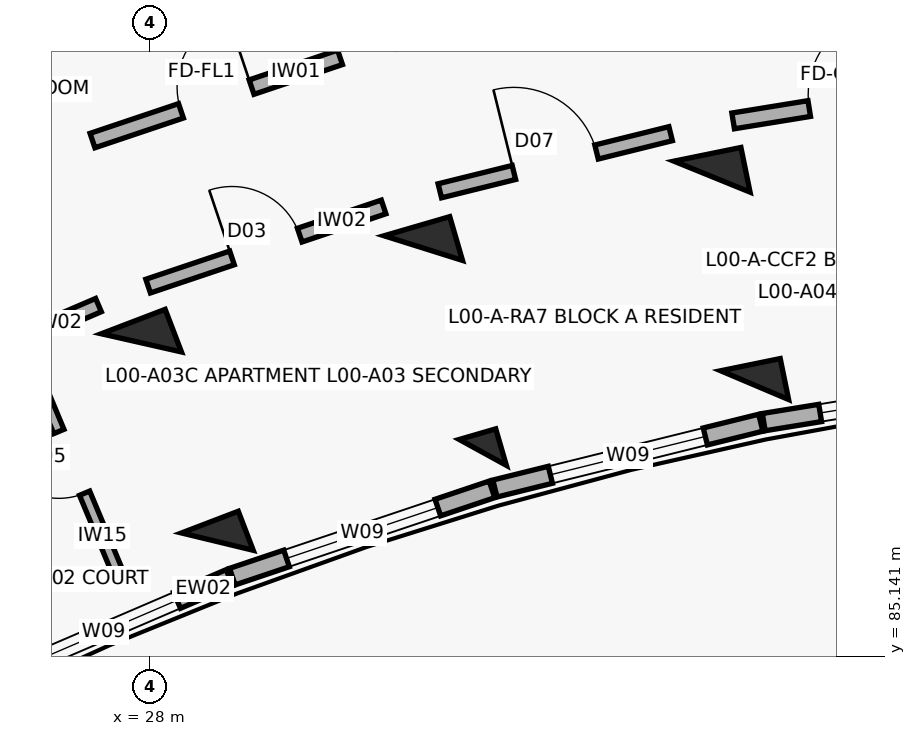
"""IFC4 building model, lengths in metres.
Left out: names, types, materials, properties, quantities, classifications, styles, units other than length and angle.
Written with IfcOpenShell. Run it as: python <this file> out.ifc"""

import sys

from ifc_helpers import new_model, si_unit, direction, frame, frame_2d, origin, origin_2d, place, context, subcontext, project, spatial, rectangle, extrude, element, fill, save


model = new_model("IFC4")
c1 = context("Model", 3, precision=1e-05, world=origin(), true_north=direction((0.0, 1.0)))
c2 = subcontext(c1, "Body", "Model", "MODEL_VIEW")
j1 = project(units=[si_unit("LENGTHUNIT", "METRE"), si_unit("PLANEANGLEUNIT", "RADIAN")], contexts=[c1])
p1 = place(None, origin())
s1 = spatial("IfcSite", under=j1, at=p1, CompositionType="ELEMENT")
p2 = place(p1, origin())
s2 = spatial("IfcBuilding", under=s1, at=p2, CompositionType="ELEMENT")
p3 = place(p2, origin())
s3 = spatial("IfcBuildingStorey", under=s2, at=p3, CompositionType="ELEMENT", Elevation=0.0)
p4 = place(p3, frame((28.889, 86.646, 0.0), z_axis=(0.0, 0.0, 1.0), x_axis=(-0.357064076459, 0.934079892355, 0.0)))
e1 = element("IfcColumn", 1, at=p4, inside=s3, PredefinedType="COLUMN", context=c2, shape_type="SweptSolid", body=[
    extrude(rectangle(XDim=0.55, YDim=0.8, at=origin_2d()), origin(), (0.0, 0.0, 1.0), 4.5),
])
p5 = place(p3, frame((27.889, 89.261, 0.0), z_axis=(0.0, 0.0, 1.0), x_axis=(-0.357064076459, 0.934079892355, 0.0)))
e2 = element("IfcColumn", 2, at=p5, inside=s3, PredefinedType="COLUMN", context=c2, shape_type="SweptSolid", body=[
    extrude(rectangle(XDim=0.6, YDim=0.9, at=origin_2d()), origin(), (0.0, 0.0, 1.0), 4.5),
])
p6 = place(p3, frame((32.382, 87.82, 0.0), z_axis=(0.0, 0.0, 1.0), x_axis=(-0.27966144946, 0.96009867914, 0.0)))
e3 = element("IfcColumn", 3, at=p6, inside=s3, PredefinedType="COLUMN", context=c2, shape_type="SweptSolid", body=[
    extrude(rectangle(XDim=0.5, YDim=0.5, at=origin_2d()), origin(), (0.0, 0.0, 1.0), 4.5),
])
p7 = place(p3, frame((31.599, 90.508, 0.0), z_axis=(0.0, 0.0, 1.0), x_axis=(-0.27966144946, 0.96009867914, 0.0)))
e4 = element("IfcColumn", 4, at=p7, inside=s3, PredefinedType="COLUMN", context=c2, shape_type="SweptSolid", body=[
    extrude(rectangle(XDim=0.6, YDim=0.9, at=origin_2d()), origin(), (0.0, 0.0, 1.0), 4.5),
])
p8 = place(p3, frame((35.958, 88.705, 0.0), z_axis=(0.0, 0.0, 1.0), x_axis=(-0.200393999665, 0.979715389742, 0.0)))
e5 = element("IfcColumn", 5, at=p8, inside=s3, PredefinedType="COLUMN", context=c2, shape_type="SweptSolid", body=[
    extrude(rectangle(XDim=0.55, YDim=0.8, at=origin_2d()), origin(), (0.0, 0.0, 1.0), 4.5),
])
p9 = place(p3, frame((35.397, 91.448, 0.0), z_axis=(0.0, 0.0, 1.0), x_axis=(-0.200393999665, 0.979715389742, 0.0)))
e6 = element("IfcColumn", 6, at=p9, inside=s3, PredefinedType="COLUMN", context=c2, shape_type="SweptSolid", body=[
    extrude(rectangle(XDim=0.6, YDim=0.9, at=origin_2d()), origin(), (0.0, 0.0, 1.0), 4.5),
])
p10 = place(p3, frame((25.739, 84.748, 0.0), z_axis=(0.0, 0.0, 1.0), x_axis=(0.918713438577, 0.394924825477, 0.0)))
e7 = element("IfcWall", 7, at=p10, inside=s3, PredefinedType="SOLIDWALL", context=c2, shape_type="SweptSolid", body=[
    extrude(rectangle(XDim=3.604, YDim=0.23, at=frame_2d((1.802, 0.0))), origin(), (0.0, 0.0, 1.0), 3.45),
])
p11 = place(p10, frame((0.752, 0.0, 0.32)))
e8 = element("IfcOpeningElement", 8, at=p11, cuts=e7, PredefinedType="OPENING", context=c2, shape_type="SweptSolid", body=[
    extrude(rectangle(XDim=2.1, YDim=1.65, at=frame_2d((1.05, 0.825))), frame((0.0, 0.125, 0.0), z_axis=(0.0, -1.0, 0.0), x_axis=(1.0, 0.0, 0.0)), (0.0, 0.0, 1.0), 0.25),
])
p12 = place(p3, frame((29.087, 86.185, 0.0), z_axis=(0.0, 0.0, 1.0), x_axis=(0.947880824442, 0.318625081649, 0.0)))
e9 = element("IfcWall", 9, at=p12, inside=s3, PredefinedType="SOLIDWALL", context=c2, shape_type="SweptSolid", body=[
    extrude(rectangle(XDim=3.604, YDim=0.23, at=frame_2d((1.802, 0.0))), origin(), (0.0, 0.0, 1.0), 3.45),
])
p13 = place(p12, frame((0.752, 0.0, 0.32)))
e10 = element("IfcOpeningElement", 10, at=p13, cuts=e9, PredefinedType="OPENING", context=c2, shape_type="SweptSolid", body=[
    extrude(rectangle(XDim=2.1, YDim=1.65, at=frame_2d((1.05, 0.825))), frame((0.0, 0.125, 0.0), z_axis=(0.0, -1.0, 0.0), x_axis=(1.0, 0.0, 0.0)), (0.0, 0.0, 1.0), 0.25),
])
p14 = place(p3, frame((32.541, 87.344, 0.0), z_axis=(0.0, 0.0, 1.0), x_axis=(0.970713661797, 0.240239436399, 0.0)))
e11 = element("IfcWall", 11, at=p14, inside=s3, PredefinedType="SOLIDWALL", context=c2, shape_type="SweptSolid", body=[
    extrude(rectangle(XDim=3.604, YDim=0.23, at=frame_2d((1.802, 0.0))), origin(), (0.0, 0.0, 1.0), 3.45),
])
p15 = place(p14, frame((0.752, 0.0, 0.32)))
e12 = element("IfcOpeningElement", 12, at=p15, cuts=e11, PredefinedType="OPENING", context=c2, shape_type="SweptSolid", body=[
    extrude(rectangle(XDim=2.1, YDim=1.65, at=frame_2d((1.05, 0.825))), frame((0.0, 0.125, 0.0), z_axis=(0.0, -1.0, 0.0), x_axis=(1.0, 0.0, 0.0)), (0.0, 0.0, 1.0), 0.25),
])
p16 = place(p3, frame((36.078, 88.218, 0.0), z_axis=(0.0, 0.0, 1.0), x_axis=(0.987080874485, 0.160222804952, 0.0)))
e13 = element("IfcWall", 13, at=p16, inside=s3, PredefinedType="SOLIDWALL", context=c2, shape_type="SweptSolid", body=[
    extrude(rectangle(XDim=3.604, YDim=0.23, at=frame_2d((1.802, 0.0))), origin(), (0.0, 0.0, 1.0), 3.45),
])
p17 = place(p16, frame((0.752, 0.0, 0.32)))
e14 = element("IfcOpeningElement", 14, at=p17, cuts=e13, PredefinedType="OPENING", context=c2, shape_type="SweptSolid", body=[
    extrude(rectangle(XDim=2.1, YDim=1.65, at=frame_2d((1.05, 0.825))), frame((0.0, 0.125, 0.0), z_axis=(0.0, -1.0, 0.0), x_axis=(1.0, 0.0, 0.0)), (0.0, 0.0, 1.0), 0.25),
])
p18 = place(p3, frame((24.322, 88.467, 0.0), z_axis=(0.0, 0.0, 1.0), x_axis=(0.918723391052, 0.394901672235, 0.0)))
e15 = element("IfcWall", 15, at=p18, inside=s3, PredefinedType="SOLIDWALL", context=c2, shape_type="SweptSolid", body=[
    extrude(rectangle(XDim=3.269, YDim=0.19, at=frame_2d((1.634, 0.0))), origin(), (0.0, 0.0, 1.0), 3.34),
])
p19 = place(p18, frame((1.174, 0.0, 0.0)))
e16 = element("IfcOpeningElement", 16, at=p19, cuts=e15, PredefinedType="OPENING", context=c2, shape_type="SweptSolid", body=[
    extrude(rectangle(XDim=0.92, YDim=2.1, at=frame_2d((0.46, 1.05))), frame((0.0, 0.105, 0.0), z_axis=(0.0, -1.0, 0.0), x_axis=(1.0, 0.0, 0.0)), (0.0, 0.0, 1.0), 0.21),
])
p20 = place(p3, frame((27.609, 86.166, 0.0), z_axis=(0.0, 0.0, 1.0), x_axis=(-0.385151143297, 0.922853507777, 0.0)))
e17 = element("IfcWall", 17, at=p20, inside=s3, PredefinedType="PARTITIONING", context=c2, shape_type="SweptSolid", body=[
    extrude(rectangle(XDim=3.3, YDim=0.145, at=frame_2d((1.65, 0.0))), origin(), (0.0, 0.0, 1.0), 3.34),
])
p21 = place(p20, frame((1.21, 0.0, 0.0)))
e18 = element("IfcOpeningElement", 18, at=p21, cuts=e17, PredefinedType="OPENING", context=c2, shape_type="SweptSolid", body=[
    extrude(rectangle(XDim=0.88, YDim=2.1, at=frame_2d((0.44, 1.05))), frame((0.0, 0.083, 0.0), z_axis=(0.0, -1.0, 0.0), x_axis=(1.0, 0.0, 0.0)), (0.0, 0.0, 1.0), 0.165),
])
p22 = place(p3, frame((27.247, 91.923, 0.0), z_axis=(0.0, 0.0, 1.0), x_axis=(0.947863007629, 0.318678080151, 0.0)))
e19 = element("IfcWall", 19, at=p22, inside=s3, PredefinedType="SOLIDWALL", context=c2, shape_type="SweptSolid", body=[
    extrude(rectangle(XDim=3.436, YDim=0.2, at=frame_2d((1.718, 0.0))), origin(), (0.0, 0.0, 1.0), 3.34),
])
p23 = place(p22, frame((1.228, 0.0, 0.0)))
e20 = element("IfcOpeningElement", 20, at=p23, cuts=e19, PredefinedType="OPENING", context=c2, shape_type="SweptSolid", body=[
    extrude(rectangle(XDim=0.98, YDim=2.15, at=frame_2d((0.49, 1.075))), frame((0.0, 0.11, 0.0), z_axis=(0.0, -1.0, 0.0), x_axis=(1.0, 0.0, 0.0)), (0.0, 0.0, 1.0), 0.22),
])
p24 = place(p3, frame((27.979, 90.008, 0.0), z_axis=(0.0, 0.0, 1.0), x_axis=(0.94787351033, 0.318646839643, 0.0)))
e21 = element("IfcWall", 21, at=p24, inside=s3, PredefinedType="SOLIDWALL", context=c2, shape_type="SweptSolid", body=[
    extrude(rectangle(XDim=3.269, YDim=0.19, at=frame_2d((1.634, 0.0))), origin(), (0.0, 0.0, 1.0), 3.34),
])
p25 = place(p24, frame((1.164, 0.0, 0.0)))
e22 = element("IfcOpeningElement", 22, at=p25, cuts=e21, PredefinedType="OPENING", context=c2, shape_type="SweptSolid", body=[
    extrude(rectangle(XDim=0.94, YDim=2.1, at=frame_2d((0.47, 1.05))), frame((0.0, 0.105, 0.0), z_axis=(0.0, -1.0, 0.0), x_axis=(1.0, 0.0, 0.0)), (0.0, 0.0, 1.0), 0.21),
])
p26 = place(p3, frame((31.816, 91.262, 0.0), z_axis=(0.0, 0.0, 1.0), x_axis=(0.970727194092, 0.240184751078, 0.0)))
e23 = element("IfcWall", 23, at=p26, inside=s3, PredefinedType="SOLIDWALL", context=c2, shape_type="SweptSolid", body=[
    extrude(rectangle(XDim=3.129, YDim=0.19, at=frame_2d((1.564, 0.0))), origin(), (0.0, 0.0, 1.0), 3.34),
])
p27 = place(p26, frame((1.004, 0.0, 0.0)))
e24 = element("IfcOpeningElement", 24, at=p27, cuts=e23, PredefinedType="OPENING", context=c2, shape_type="SweptSolid", body=[
    extrude(rectangle(XDim=1.12, YDim=2.15, at=frame_2d((0.56, 1.075))), frame((0.0, 0.105, 0.0), z_axis=(0.0, -1.0, 0.0), x_axis=(1.0, 0.0, 0.0)), (0.0, 0.0, 1.0), 0.21),
])
p28 = place(p3, frame((35.676, 92.181, 0.0), z_axis=(0.0, 0.0, 1.0), x_axis=(0.98707079686, 0.160284877599, 0.0)))
e25 = element("IfcWall", 25, at=p28, inside=s3, PredefinedType="SOLIDWALL", context=c2, shape_type="SweptSolid", body=[
    extrude(rectangle(XDim=3.129, YDim=0.21, at=frame_2d((1.564, 0.0))), origin(), (0.0, 0.0, 1.0), 3.34),
])
p29 = place(p28, frame((1.014, 0.0, 0.0)))
e26 = element("IfcOpeningElement", 26, at=p29, cuts=e25, PredefinedType="OPENING", context=c2, shape_type="SweptSolid", body=[
    extrude(rectangle(XDim=1.1, YDim=2.15, at=frame_2d((0.55, 1.075))), frame((0.0, 0.115, 0.0), z_axis=(0.0, -1.0, 0.0), x_axis=(1.0, 0.0, 0.0)), (0.0, 0.0, 1.0), 0.23),
])
p30 = place(p11, origin())
e27 = element("IfcWindow", 27, at=p30, inside=s3, PartitioningType="TRIPLE_PANEL_VERTICAL", PredefinedType="WINDOW", context=c2, shape_type="SweptSolid", body=[
    extrude(rectangle(XDim=2.1, YDim=1.65, at=frame_2d((1.05, 0.825))), frame((0.0, 0.03, 0.0), z_axis=(0.0, -1.0, 0.0), x_axis=(1.0, 0.0, 0.0)), (0.0, 0.0, 1.0), 0.06),
])
fill(e8, e27)
p31 = place(p13, origin())
e28 = element("IfcWindow", 28, at=p31, inside=s3, PartitioningType="TRIPLE_PANEL_VERTICAL", PredefinedType="WINDOW", context=c2, shape_type="SweptSolid", body=[
    extrude(rectangle(XDim=2.1, YDim=1.65, at=frame_2d((1.05, 0.825))), frame((0.0, 0.03, 0.0), z_axis=(0.0, -1.0, 0.0), x_axis=(1.0, 0.0, 0.0)), (0.0, 0.0, 1.0), 0.06),
])
fill(e10, e28)
p32 = place(p15, origin())
e29 = element("IfcWindow", 29, at=p32, inside=s3, PartitioningType="TRIPLE_PANEL_VERTICAL", PredefinedType="WINDOW", context=c2, shape_type="SweptSolid", body=[
    extrude(rectangle(XDim=2.1, YDim=1.65, at=frame_2d((1.05, 0.825))), frame((0.0, 0.03, 0.0), z_axis=(0.0, -1.0, 0.0), x_axis=(1.0, 0.0, 0.0)), (0.0, 0.0, 1.0), 0.06),
])
fill(e12, e29)
p33 = place(p17, origin())
e30 = element("IfcWindow", 30, at=p33, inside=s3, PartitioningType="TRIPLE_PANEL_VERTICAL", PredefinedType="WINDOW", context=c2, shape_type="SweptSolid", body=[
    extrude(rectangle(XDim=2.1, YDim=1.65, at=frame_2d((1.05, 0.825))), frame((0.0, 0.03, 0.0), z_axis=(0.0, -1.0, 0.0), x_axis=(1.0, 0.0, 0.0)), (0.0, 0.0, 1.0), 0.06),
])
fill(e14, e30)
p34 = place(p21, origin())
e31 = element("IfcDoor", 31, at=p34, inside=s3, OperationType="SINGLE_SWING_RIGHT", PredefinedType="DOOR", context=c2, shape_type="SweptSolid", body=[
    extrude(rectangle(XDim=0.88, YDim=2.1, at=frame_2d((0.44, 1.05))), frame((0.0, 0.025, 0.0), z_axis=(0.0, -1.0, 0.0), x_axis=(1.0, 0.0, 0.0)), (0.0, 0.0, 1.0), 0.05),
])
fill(e18, e31)
p35 = place(p23, origin())
e32 = element("IfcDoor", 32, at=p35, inside=s3, OperationType="SINGLE_SWING_RIGHT", PredefinedType="DOOR", context=c2, shape_type="SweptSolid", body=[
    extrude(rectangle(XDim=0.98, YDim=2.15, at=frame_2d((0.49, 1.075))), frame((0.0, 0.025, 0.0), z_axis=(0.0, -1.0, 0.0), x_axis=(1.0, 0.0, 0.0)), (0.0, 0.0, 1.0), 0.05),
])
fill(e20, e32)
p36 = place(p25, origin())
e33 = element("IfcDoor", 33, at=p36, inside=s3, OperationType="SINGLE_SWING_LEFT", PredefinedType="DOOR", context=c2, shape_type="SweptSolid", body=[
    extrude(rectangle(XDim=0.94, YDim=2.1, at=frame_2d((0.47, 1.05))), frame((0.0, 0.025, 0.0), z_axis=(0.0, -1.0, 0.0), x_axis=(1.0, 0.0, 0.0)), (0.0, 0.0, 1.0), 0.05),
])
fill(e22, e33)
p37 = place(p27, origin())
e34 = element("IfcDoor", 34, at=p37, inside=s3, OperationType="SINGLE_SWING_LEFT", PredefinedType="DOOR", context=c2, shape_type="SweptSolid", body=[
    extrude(rectangle(XDim=1.12, YDim=2.15, at=frame_2d((0.56, 1.075))), frame((0.0, 0.025, 0.0), z_axis=(0.0, -1.0, 0.0), x_axis=(1.0, 0.0, 0.0)), (0.0, 0.0, 1.0), 0.05),
])
fill(e24, e34)
p38 = place(p29, origin())
e35 = element("IfcDoor", 35, at=p38, inside=s3, OperationType="SINGLE_SWING_RIGHT", PredefinedType="DOOR", context=c2, shape_type="SweptSolid", body=[
    extrude(rectangle(XDim=1.1, YDim=2.15, at=frame_2d((0.55, 1.075))), frame((0.0, 0.025, 0.0), z_axis=(0.0, -1.0, 0.0), x_axis=(1.0, 0.0, 0.0)), (0.0, 0.0, 1.0), 0.05),
])
fill(e26, e35)
save(model, sys.argv[1])
